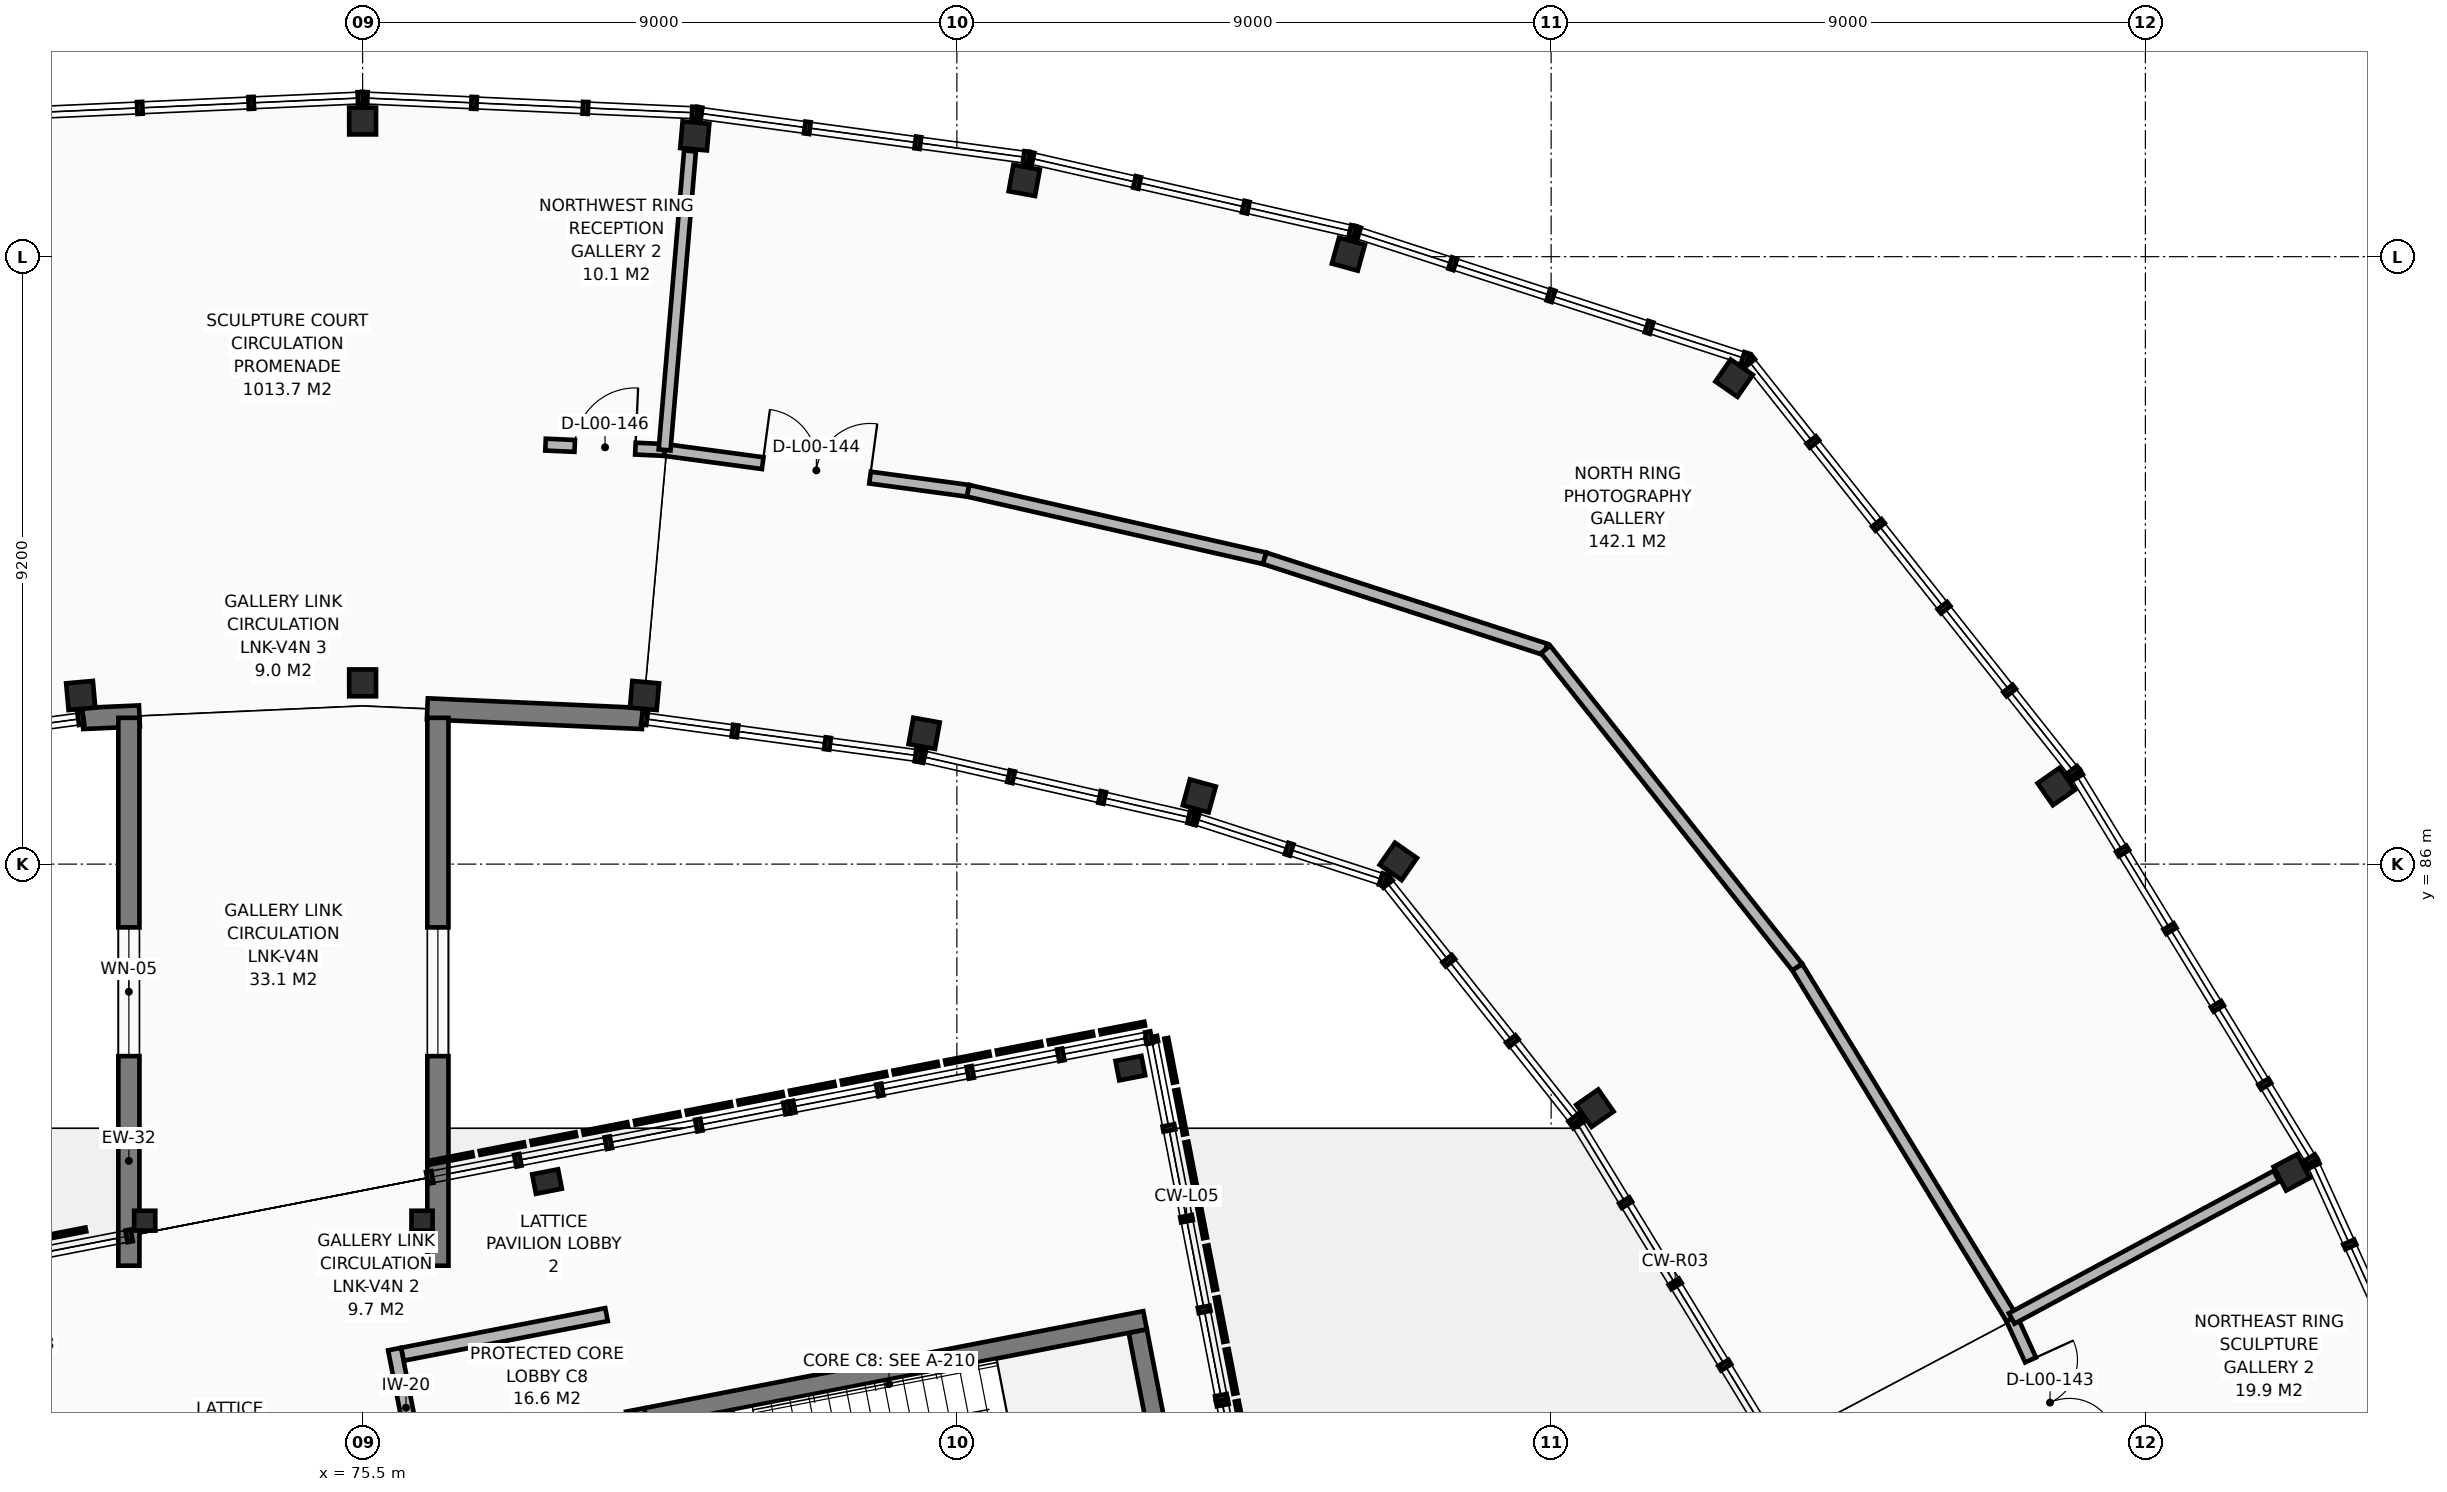
"""IFC4 building model, lengths in metres.
Left out: names, types, materials, properties, quantities, classifications, styles, units other than length and angle.
Written with IfcOpenShell. Run it as: python <this file> out.ifc"""

import sys

from ifc_helpers import new_model, si_unit, direction, frame, frame_2d, origin, origin_2d, place, context, subcontext, project, spatial, rectangle, hollow_circle, i_section, extrude, element, fill, save


model = new_model("IFC4")
c1 = context("Model", 3, precision=1e-05, world=origin(), true_north=direction((0.0, 1.0)))
c2 = subcontext(c1, "Body", "Model", "MODEL_VIEW")
j1 = project(units=[si_unit("LENGTHUNIT", "METRE"), si_unit("PLANEANGLEUNIT", "RADIAN")], contexts=[c1])
p1 = place(None, origin())
s1 = spatial("IfcSite", under=j1, at=p1, CompositionType="ELEMENT")
p2 = place(p1, origin())
s2 = spatial("IfcBuilding", under=s1, at=p2, CompositionType="ELEMENT")
p3 = place(p2, origin())
s3 = spatial("IfcBuildingStorey", under=s2, at=p3, CompositionType="ELEMENT", Elevation=0.0)
for number, where, z_axis, x_axis in (
    (1, (104.716, 81.331, 0.0), (0.0, 0.0, 1.0), (-0.884, -0.468, 0.0)),
    (2, (101.15, 87.175, 0.0), (0.0, 0.0, 1.0), (-0.82, -0.572, 0.0)),
    (3, (94.163, 82.304, 0.0), (0.0, 0.0, 1.0), (-0.82, -0.572, 0.0)),
    (4, (96.271, 93.36, 0.0), (0.0, 0.0, 1.0), (-0.571, -0.821, 0.0)),
    (5, (91.186, 86.041, 0.0), (0.0, 0.0, 1.0), (-0.571, -0.821, 0.0)),
    (6, (90.43, 95.237, 0.0), (0.0, 0.0, 1.0), (-0.265, -0.964, 0.0)),
    (7, (88.171, 87.033, 0.0), (0.0, 0.0, 1.0), (-0.265, -0.964, 0.0)),
    (8, (85.52, 96.355, 0.0), (0.0, 0.0, 1.0), (-0.178, -0.984, 0.0)),
    (9, (84.004, 87.982, 0.0), (0.0, 0.0, 1.0), (-0.178, -0.984, 0.0)),
    (10, (80.53, 97.029, 0.0), (0.0, 0.0, 1.0), (-0.089, -0.996, 0.0)),
    (11, (79.769, 88.554, 0.0), (0.0, 0.0, 1.0), (-0.089, -0.996, 0.0)),
    (12, (75.5, 97.255, 0.0), (0.0, 0.0, 1.0), (0.0, -1.0, 0.0)),
    (13, (75.5, 88.745, 0.0), (0.0, 0.0, 1.0), (0.0, -1.0, 0.0)),
    (14, (71.231, 88.554, 0.0), (0.0, 0.0, 1.0), (0.089, -0.996, 0.0)),
):
    element("IfcColumn", number, at=place(p3, frame(where, z_axis=z_axis, x_axis=x_axis)), inside=s3, PredefinedType="COLUMN", context=c2, shape_type="SweptSolid", body=[
        extrude(hollow_circle(Radius=0.203, WallThickness=0.02, at=origin_2d()), origin(), (0.0, 0.0, 1.0), 5.1),
    ])
for number, where, z_axis, x_axis in (
    (15, (78.293, 81.193, 0.0), (0.0, 0.0, 1.0), (0.982, 0.191, 0.0)),
    (16, (87.127, 82.91, 0.0), (0.0, 0.0, 1.0), (0.982, 0.191, 0.0)),
):
    element("IfcColumn", number, at=place(p3, frame(where, z_axis=z_axis, x_axis=x_axis)), inside=s3, PredefinedType="COLUMN", context=c2, shape_type="SweptSolid", body=[
        extrude(i_section(OverallWidth=0.3, OverallDepth=0.4, WebThickness=0.013, FlangeThickness=0.024, FilletRadius=0.027, at=origin_2d()), origin(), (0.0, 0.0, 1.0), 5.1),
    ])
for number, where, z_axis, x_axis in (
    (17, (72.2, 80.6, 0.0), (0.0, 0.0, 1.0), (1.0, 0.0, 0.0)),
    (18, (76.4, 80.6, 0.0), (0.0, 0.0, 1.0), (1.0, 0.0, 0.0)),
):
    element("IfcColumn", number, at=place(p3, frame(where, z_axis=z_axis, x_axis=x_axis)), inside=s3, PredefinedType="COLUMN", context=c2, shape_type="SweptSolid", body=[
        extrude(i_section(OverallWidth=0.3, OverallDepth=0.32, WebThickness=0.011, FlangeThickness=0.021, FilletRadius=0.027, at=origin_2d()), origin(), (0.0, 0.0, 1.0), 5.1),
    ])
p4 = place(p3, frame((79.738, 88.206, 0.0), z_axis=(0.0, 0.0, 1.0), x_axis=(-0.998997506034, 0.044765868011, 0.0)))
e19 = element("IfcWall", 19, at=p4, inside=s3, PredefinedType="SOLIDWALL", context=c2, shape_type="SweptSolid", body=[
    extrude(rectangle(XDim=3.261, YDim=0.32, at=frame_2d((1.631, 0.0))), origin(), (0.0, 0.0, 1.0), 4.88),
])
p5 = place(p3, frame((72.12, 88.244, 0.0), z_axis=(0.0, 0.0, 1.0), x_axis=(-0.999003976874, -0.044621230262, 0.0)))
e20 = element("IfcWall", 20, at=p5, inside=s3, PredefinedType="SOLIDWALL", context=c2, shape_type="SweptSolid", body=[
    extrude(rectangle(XDim=0.859, YDim=0.32, at=frame_2d((0.43, 0.0))), origin(), (0.0, 0.0, 1.0), 4.88),
])
p6 = place(p3, frame((71.96, 79.918, 0.0), z_axis=(0.0, 0.0, 1.0), x_axis=(0.0, 1.0, 0.0)))
e21 = element("IfcWall", 21, at=p6, inside=s3, PredefinedType="SOLIDWALL", context=c2, shape_type="SweptSolid", body=[
    extrude(rectangle(XDim=8.297, YDim=0.32, at=frame_2d((4.149, 0.0))), origin(), (0.0, 0.0, 1.0), 4.82),
])
p7 = place(p6, frame((3.174, 0.0, 1.12)))
e22 = element("IfcOpeningElement", 22, at=p7, cuts=e21, PredefinedType="OPENING", context=c2, shape_type="SweptSolid", body=[
    extrude(rectangle(XDim=1.95, YDim=1.5, at=frame_2d((0.975, 0.75))), frame((0.0, 0.17, 0.0), z_axis=(0.0, -1.0, 0.0), x_axis=(1.0, 0.0, 0.0)), (0.0, 0.0, 1.0), 0.34),
])
p8 = place(p3, frame((76.64, 88.215, 0.0), z_axis=(0.0, 0.0, 1.0), x_axis=(0.0, -1.0, 0.0)))
e23 = element("IfcWall", 23, at=p8, inside=s3, PredefinedType="SOLIDWALL", context=c2, shape_type="SweptSolid", body=[
    extrude(rectangle(XDim=8.297, YDim=0.32, at=frame_2d((4.149, 0.0))), origin(), (0.0, 0.0, 1.0), 4.82),
])
p9 = place(p8, frame((3.174, 0.0, 1.12)))
e24 = element("IfcOpeningElement", 24, at=p9, cuts=e23, PredefinedType="OPENING", context=c2, shape_type="SweptSolid", body=[
    extrude(rectangle(XDim=1.95, YDim=1.5, at=frame_2d((0.975, 0.75))), frame((0.0, 0.17, 0.0), z_axis=(0.0, -1.0, 0.0), x_axis=(1.0, 0.0, 0.0)), (0.0, 0.0, 1.0), 0.34),
])
p10 = place(p3, frame((87.827, 75.905, 0.0), z_axis=(0.0, 0.0, 1.0), x_axis=(-0.190869659102, 0.981615389669, 0.0)))
e25 = element("IfcWall", 25, at=p10, inside=s3, PredefinedType="SHEAR", context=c2, shape_type="SweptSolid", body=[
    extrude(rectangle(XDim=3.08, YDim=0.28, at=frame_2d((1.54, 0.0))), origin(), (0.0, 0.0, 1.0), 4.88),
])
p11 = place(p3, frame((87.35, 79.092, 0.0), z_axis=(0.0, 0.0, 1.0), x_axis=(-0.98162132967, -0.190839107987, 0.0)))
e26 = element("IfcWall", 26, at=p11, inside=s3, PredefinedType="SHEAR", context=c2, shape_type="SweptSolid", body=[
    extrude(rectangle(XDim=7.7, YDim=0.28, at=frame_2d((3.85, 0.0))), origin(), (0.0, 0.0, 1.0), 4.88),
])
p12 = place(p3, frame((79.627, 77.734, 0.0), z_axis=(0.0, 0.0, 1.0), x_axis=(0.190812213529, -0.981626557897, 0.0)))
e27 = element("IfcWall", 27, at=p12, inside=s3, PredefinedType="SHEAR", context=c2, shape_type="SweptSolid", body=[
    extrude(rectangle(XDim=3.64, YDim=0.28, at=frame_2d((1.82, 0.0))), origin(), (0.0, 0.0, 1.0), 4.88),
])
p13 = place(p12, frame((1.2, 0.0, 0.0)))
e28 = element("IfcOpeningElement", 28, at=p13, cuts=e27, PredefinedType="OPENING", context=c2, shape_type="SweptSolid", body=[
    extrude(rectangle(XDim=1.32, YDim=2.12, at=frame_2d((0.66, 1.06))), frame((0.0, 0.15, 0.0), z_axis=(0.0, -1.0, 0.0), x_axis=(1.0, 0.0, 0.0)), (0.0, 0.0, 1.0), 0.3),
])
p14 = place(p3, frame((79.194, 79.177, 0.0), z_axis=(0.0, 0.0, 1.0), x_axis=(-0.981624666284, -0.190821944603, 0.0)))
e29 = element("IfcWall", 29, at=p14, inside=s3, PredefinedType="PARTITIONING", context=c2, shape_type="SweptSolid", body=[
    extrude(rectangle(XDim=3.15, YDim=0.2, at=frame_2d((1.575, 0.0))), origin(), (0.0, 0.0, 1.0), 4.47),
])
p15 = place(p3, frame((76.958, 73.649, 0.0), z_axis=(0.0, 0.0, 1.0), x_axis=(-0.190810719655, 0.98162684828, 0.0)))
e30 = element("IfcWall", 30, at=p15, inside=s3, PredefinedType="PARTITIONING", context=c2, shape_type="SweptSolid", body=[
    extrude(rectangle(XDim=5.1, YDim=0.2, at=frame_2d((2.55, 0.0))), origin(), (0.0, 0.0, 1.0), 4.53),
])
p16 = place(p15, frame((1.81, 0.0, 0.0)))
e31 = element("IfcOpeningElement", 31, at=p16, cuts=e30, PredefinedType="OPENING", context=c2, shape_type="SweptSolid", body=[
    extrude(rectangle(XDim=1.48, YDim=2.15, at=frame_2d((0.74, 1.075))), frame((0.0, 0.11, 0.0), z_axis=(0.0, -1.0, 0.0), x_axis=(1.0, 0.0, 0.0)), (0.0, 0.0, 1.0), 0.22),
])
p17 = place(p3, frame((100.475, 79.119, 0.0), z_axis=(0.0, 0.0, 1.0), x_axis=(0.414597499108, -0.910004897643, 0.0)))
e32 = element("IfcWall", 32, at=p17, inside=s3, PredefinedType="PARTITIONING", context=c2, shape_type="SweptSolid", body=[
    extrude(rectangle(XDim=2.801, YDim=0.18, at=frame_2d((1.4, 0.0))), origin(), (0.0, 0.0, 1.0), 4.37),
])
p18 = place(p17, frame((0.69, 0.0, 0.0)))
e33 = element("IfcOpeningElement", 33, at=p18, cuts=e32, PredefinedType="OPENING", context=c2, shape_type="SweptSolid", body=[
    extrude(rectangle(XDim=1.42, YDim=2.18, at=frame_2d((0.71, 1.09))), frame((0.0, 0.1, 0.0), z_axis=(0.0, -1.0, 0.0), x_axis=(1.0, 0.0, 0.0)), (0.0, 0.0, 1.0), 0.2),
])
p19 = place(p3, frame((80.073, 92.273, 0.0), z_axis=(0.0, 0.0, 1.0), x_axis=(0.991068153598, -0.133356345647, 0.0)))
e34 = element("IfcWall", 34, at=p19, inside=s3, PredefinedType="PARTITIONING", context=c2, shape_type="SweptSolid", body=[
    extrude(rectangle(XDim=4.639, YDim=0.18, at=frame_2d((2.32, 0.0))), origin(), (0.0, 0.0, 1.0), 4.37),
])
p20 = place(p19, frame((1.5, 0.0, 0.0)))
e35 = element("IfcOpeningElement", 35, at=p20, cuts=e34, PredefinedType="OPENING", context=c2, shape_type="SweptSolid", body=[
    extrude(rectangle(XDim=1.64, YDim=2.2, at=frame_2d((0.82, 1.1))), frame((0.0, 0.1, 0.0), z_axis=(0.0, -1.0, 0.0), x_axis=(1.0, 0.0, 0.0)), (0.0, 0.0, 1.0), 0.2),
])
p21 = place(p3, frame((84.671, 91.654, 0.0), z_axis=(0.0, 0.0, 1.0), x_axis=(0.975049979992, -0.221985442131, 0.0)))
e36 = element("IfcWall", 36, at=p21, inside=s3, PredefinedType="PARTITIONING", context=c2, shape_type="SweptSolid", body=[
    extrude(rectangle(XDim=4.605, YDim=0.18, at=frame_2d((2.302, 0.0))), origin(), (0.0, 0.0, 1.0), 4.37),
])
p22 = place(p3, frame((89.161, 90.632, 0.0), z_axis=(0.0, 0.0, 1.0), x_axis=(0.95121156526, -0.308539394755, 0.0)))
e37 = element("IfcWall", 37, at=p22, inside=s3, PredefinedType="PARTITIONING", context=c2, shape_type="SweptSolid", body=[
    extrude(rectangle(XDim=4.474, YDim=0.18, at=frame_2d((2.237, 0.0))), origin(), (0.0, 0.0, 1.0), 4.37),
])
p23 = place(p3, frame((93.416, 89.251, 0.0), z_axis=(0.0, 0.0, 1.0), x_axis=(0.620919863194, -0.783874048232, 0.0)))
e38 = element("IfcWall", 38, at=p23, inside=s3, PredefinedType="PARTITIONING", context=c2, shape_type="SweptSolid", body=[
    extrude(rectangle(XDim=6.14, YDim=0.18, at=frame_2d((3.07, 0.0))), origin(), (0.0, 0.0, 1.0), 4.37),
])
p24 = place(p3, frame((97.229, 84.439, 0.0), z_axis=(0.0, 0.0, 1.0), x_axis=(0.520915928932, -0.853607986716, 0.0)))
e39 = element("IfcWall", 39, at=p24, inside=s3, PredefinedType="PARTITIONING", context=c2, shape_type="SweptSolid", body=[
    extrude(rectangle(XDim=6.232, YDim=0.18, at=frame_2d((3.116, 0.0))), origin(), (0.0, 0.0, 1.0), 4.37),
])
p25 = place(p3, frame((78.27, 92.354, 0.0), z_axis=(0.0, 0.0, 1.0), x_axis=(0.99899706853, -0.044775630289, 0.0)))
e40 = element("IfcWall", 40, at=p25, inside=s3, PredefinedType="PARTITIONING", context=c2, shape_type="SweptSolid", body=[
    extrude(rectangle(XDim=1.805, YDim=0.18, at=frame_2d((0.902, 0.0))), origin(), (0.0, 0.0, 1.0), 4.37),
])
p26 = place(p25, frame((0.442, 0.0, 0.0)))
e41 = element("IfcOpeningElement", 41, at=p26, cuts=e40, PredefinedType="OPENING", context=c2, shape_type="SweptSolid", body=[
    extrude(rectangle(XDim=0.92, YDim=2.08, at=frame_2d((0.46, 1.04))), frame((0.0, 0.1, 0.0), z_axis=(0.0, -1.0, 0.0), x_axis=(1.0, 0.0, 0.0)), (0.0, 0.0, 1.0), 0.2),
])
p27 = place(p3, frame((71.651, 72.23, 0.0), z_axis=(0.0, 0.0, 1.0), x_axis=(-0.190786732806, 0.981631510591, 0.0)))
e42 = element("IfcWall", 42, at=p27, inside=s3, PredefinedType="PARTITIONING", context=c2, shape_type="SweptSolid", body=[
    extrude(rectangle(XDim=7.88, YDim=0.18, at=frame_2d((3.94, 0.0))), origin(), (0.0, 0.0, 1.0), 4.47),
])
p28 = place(p27, frame((3.23, 0.0, 0.0)))
e43 = element("IfcOpeningElement", 43, at=p28, cuts=e42, PredefinedType="OPENING", context=c2, shape_type="SweptSolid", body=[
    extrude(rectangle(XDim=1.42, YDim=2.18, at=frame_2d((0.71, 1.09))), frame((0.0, 0.1, 0.0), z_axis=(0.0, -1.0, 0.0), x_axis=(1.0, 0.0, 0.0)), (0.0, 0.0, 1.0), 0.2),
])
p29 = place(p3, frame((100.476, 79.119, 0.0), z_axis=(0.0, 0.0, 1.0), x_axis=(0.880691517808, 0.473690247379, 0.0)))
e44 = element("IfcWall", 44, at=p29, inside=s3, PredefinedType="PARTITIONING", context=c2, shape_type="SweptSolid", body=[
    extrude(rectangle(XDim=4.551, YDim=0.18, at=frame_2d((2.275, 0.0))), origin(), (0.0, 0.0, 1.0), 4.37),
])
p30 = place(p3, frame((80.073, 92.273, 0.0), z_axis=(0.0, 0.0, 1.0), x_axis=(0.084735134654, 0.996403511111, 0.0)))
e45 = element("IfcWall", 45, at=p30, inside=s3, PredefinedType="PARTITIONING", context=c2, shape_type="SweptSolid", body=[
    extrude(rectangle(XDim=4.544, YDim=0.18, at=frame_2d((2.272, 0.0))), origin(), (0.0, 0.0, 1.0), 4.37),
])
p31 = place(p7, origin())
e46 = element("IfcWindow", 46, at=p31, inside=s3, PartitioningType="SINGLE_PANEL", PredefinedType="WINDOW", context=c2, shape_type="SweptSolid", body=[
    extrude(rectangle(XDim=1.95, YDim=1.5, at=frame_2d((0.975, 0.75))), frame((0.0, 0.03, 0.0), z_axis=(0.0, -1.0, 0.0), x_axis=(1.0, 0.0, 0.0)), (0.0, 0.0, 1.0), 0.06),
])
fill(e22, e46)
p32 = place(p9, origin())
e47 = element("IfcWindow", 47, at=p32, inside=s3, PartitioningType="SINGLE_PANEL", PredefinedType="WINDOW", context=c2, shape_type="SweptSolid", body=[
    extrude(rectangle(XDim=1.95, YDim=1.5, at=frame_2d((0.975, 0.75))), frame((0.0, 0.03, 0.0), z_axis=(0.0, -1.0, 0.0), x_axis=(1.0, 0.0, 0.0)), (0.0, 0.0, 1.0), 0.06),
])
fill(e24, e47)
p33 = place(p18, origin())
e48 = element("IfcDoor", 48, at=p33, inside=s3, OperationType="DOUBLE_DOOR_SINGLE_SWING", PredefinedType="DOOR", context=c2, shape_type="SweptSolid", body=[
    extrude(rectangle(XDim=1.42, YDim=2.18, at=frame_2d((0.71, 1.09))), frame((0.0, 0.025, 0.0), z_axis=(0.0, -1.0, 0.0), x_axis=(1.0, 0.0, 0.0)), (0.0, 0.0, 1.0), 0.05),
])
fill(e33, e48)
p34 = place(p20, origin())
e49 = element("IfcDoor", 49, at=p34, inside=s3, OperationType="DOUBLE_DOOR_SINGLE_SWING", PredefinedType="DOOR", context=c2, shape_type="SweptSolid", body=[
    extrude(rectangle(XDim=1.64, YDim=2.2, at=frame_2d((0.82, 1.1))), frame((0.0, 0.025, 0.0), z_axis=(0.0, -1.0, 0.0), x_axis=(1.0, 0.0, 0.0)), (0.0, 0.0, 1.0), 0.05),
])
fill(e35, e49)
p35 = place(p26, origin())
e50 = element("IfcDoor", 50, at=p35, inside=s3, OperationType="SINGLE_SWING_RIGHT", PredefinedType="DOOR", context=c2, shape_type="SweptSolid", body=[
    extrude(rectangle(XDim=0.92, YDim=2.08, at=frame_2d((0.46, 1.04))), frame((0.0, 0.025, 0.0), z_axis=(0.0, -1.0, 0.0), x_axis=(1.0, 0.0, 0.0)), (0.0, 0.0, 1.0), 0.05),
])
fill(e41, e50)
save(model, sys.argv[1])
